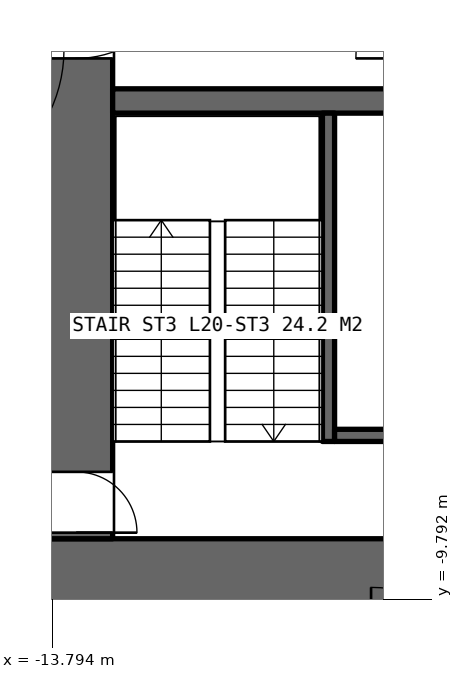
"""IFC4 building model, lengths in metres.
Left out: names, types, materials, properties, quantities, classifications, styles, units other than length and angle.
Written with IfcOpenShell. Run it as: python <this file> out.ifc"""

import sys

from ifc_helpers import new_model, si_unit, direction, frame, frame_2d, origin, place, context, subcontext, project, spatial, rectangle, extrude, element, fill, save


model = new_model("IFC4")
c1 = context("Model", 3, precision=1e-05, world=origin(), true_north=direction((0.0, 1.0)))
c2 = subcontext(c1, "Body", "Model", "MODEL_VIEW")
j1 = project(units=[si_unit("LENGTHUNIT", "METRE"), si_unit("PLANEANGLEUNIT", "RADIAN")], contexts=[c1])
p1 = place(None, origin())
s1 = spatial("IfcSite", under=j1, at=p1, CompositionType="ELEMENT")
p2 = place(p1, origin())
s2 = spatial("IfcBuilding", under=s1, at=p2, CompositionType="ELEMENT")
p3 = place(p2, frame((0.0, 0.0, 100.0)))
s3 = spatial("IfcBuildingStorey", under=s2, at=p3, CompositionType="ELEMENT", Elevation=100.0)
p4 = place(p3, frame((-14.0, -9.4, 0.0), z_axis=(0.0, 0.0, 1.0), x_axis=(1.0, 0.0, 0.0)))
e1 = element("IfcWall", 1, at=p4, inside=s3, PredefinedType="SHEAR", context=c2, shape_type="SweptSolid", body=[
    extrude(rectangle(XDim=28.0, YDim=1.2, at=frame_2d((14.0, 0.0))), origin(), (0.0, 0.0, 1.0), 5.0),
])
p5 = place(p4, frame((13.1, 0.0, 0.0)))
e2 = element("IfcOpeningElement", 2, at=p5, cuts=e1, PredefinedType="OPENING", context=c2, shape_type="SweptSolid", body=[
    extrude(rectangle(XDim=1.8, YDim=2.4, at=frame_2d((0.9, 1.2))), frame((0.0, 0.61, 0.0), z_axis=(0.0, -1.0, 0.0), x_axis=(1.0, 0.0, 0.0)), (0.0, 0.0, 1.0), 1.22),
])
p6 = place(p4, frame((22.9, 0.0, 0.0)))
e3 = element("IfcOpeningElement", 3, at=p6, cuts=e1, PredefinedType="OPENING", context=c2, shape_type="SweptSolid", body=[
    extrude(rectangle(XDim=2.2, YDim=2.7, at=frame_2d((1.1, 1.35))), frame((0.0, 0.61, 0.0), z_axis=(0.0, -1.0, 0.0), x_axis=(1.0, 0.0, 0.0)), (0.0, 0.0, 1.0), 1.22),
])
p7 = place(p3, frame((-13.4, 8.8, 0.0), z_axis=(0.0, 0.0, 1.0), x_axis=(0.0, -1.0, 0.0)))
e4 = element("IfcWall", 4, at=p7, inside=s3, PredefinedType="SHEAR", context=c2, shape_type="SweptSolid", body=[
    extrude(rectangle(XDim=17.6, YDim=1.2, at=frame_2d((8.8, 0.0))), origin(), (0.0, 0.0, 1.0), 5.0),
])
p8 = place(p7, frame((7.9, 0.0, 0.0)))
e5 = element("IfcOpeningElement", 5, at=p8, cuts=e4, PredefinedType="OPENING", context=c2, shape_type="SweptSolid", body=[
    extrude(rectangle(XDim=1.8, YDim=2.4, at=frame_2d((0.9, 1.2))), frame((0.0, 0.61, 0.0), z_axis=(0.0, -1.0, 0.0), x_axis=(1.0, 0.0, 0.0)), (0.0, 0.0, 1.0), 1.22),
])
p9 = place(p7, frame((16.5, 0.0, 0.0)))
e6 = element("IfcOpeningElement", 6, at=p9, cuts=e4, PredefinedType="OPENING", context=c2, shape_type="SweptSolid", body=[
    extrude(rectangle(XDim=1.0, YDim=2.4, at=frame_2d((0.5, 1.2))), frame((0.0, 0.61, 0.0), z_axis=(0.0, -1.0, 0.0), x_axis=(1.0, 0.0, 0.0)), (0.0, 0.0, 1.0), 1.22),
])
p10 = place(p3, frame((-12.8, -1.6, 0.0), z_axis=(0.0, 0.0, 1.0), x_axis=(1.0, 0.0, 0.0)))
e7 = element("IfcWall", 7, at=p10, inside=s3, PredefinedType="SHEAR", context=c2, shape_type="SweptSolid", body=[
    extrude(rectangle(XDim=5.6, YDim=0.4, at=frame_2d((2.8, 0.0))), origin(), (0.0, 0.0, 1.0), 5.0),
])
p11 = place(p3, frame((-9.25, -7.2, 0.0), z_axis=(0.0, 0.0, 1.0), x_axis=(0.0, 1.0, 0.0)))
e8 = element("IfcWall", 8, at=p11, inside=s3, PredefinedType="SOLIDWALL", context=c2, shape_type="SweptSolid", body=[
    extrude(rectangle(XDim=5.4, YDim=0.2, at=frame_2d((2.7, 0.0))), origin(), (0.0, 0.0, 1.0), 5.0),
])
p12 = place(p3, frame((-9.15, -7.1, 0.0), z_axis=(0.0, 0.0, 1.0), x_axis=(1.0, 0.0, 0.0)))
e9 = element("IfcWall", 9, at=p12, inside=s3, PredefinedType="SOLIDWALL", context=c2, shape_type="SweptSolid", body=[
    extrude(rectangle(XDim=1.95, YDim=0.2, at=frame_2d((0.975, 0.0))), origin(), (0.0, 0.0, 1.0), 5.0),
])
p13 = place(p8, origin())
e10 = element("IfcDoor", 10, at=p13, inside=s3, OperationType="DOUBLE_DOOR_SINGLE_SWING", PredefinedType="DOOR", context=c2, shape_type="SweptSolid", body=[
    extrude(rectangle(XDim=1.8, YDim=2.4, at=frame_2d((0.9, 1.2))), frame((0.0, 0.025, 0.0), z_axis=(0.0, -1.0, 0.0), x_axis=(1.0, 0.0, 0.0)), (0.0, 0.0, 1.0), 0.05),
])
fill(e5, e10)
p14 = place(p9, origin())
e11 = element("IfcDoor", 11, at=p14, inside=s3, OperationType="SINGLE_SWING_RIGHT", PredefinedType="DOOR", context=c2, shape_type="SweptSolid", body=[
    extrude(rectangle(XDim=1.0, YDim=2.4, at=frame_2d((0.5, 1.2))), frame((0.0, 0.025, 0.0), z_axis=(0.0, -1.0, 0.0), x_axis=(1.0, 0.0, 0.0)), (0.0, 0.0, 1.0), 0.05),
])
fill(e6, e11)
save(model, sys.argv[1])
